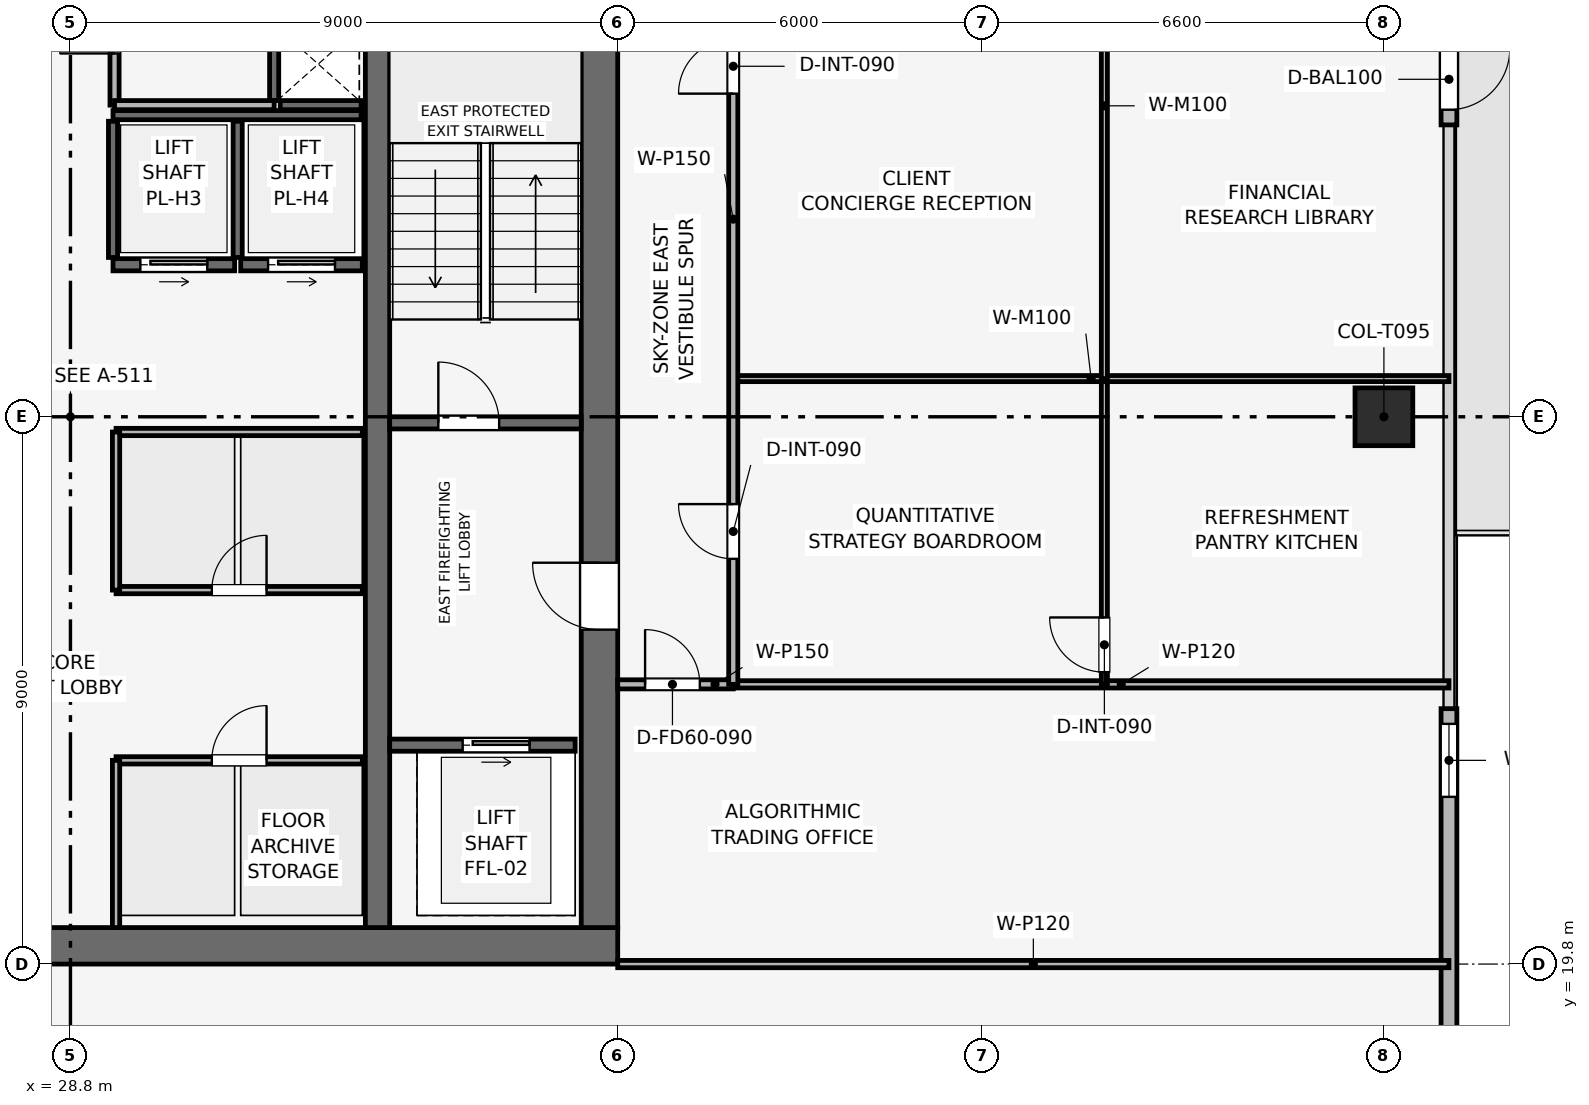
"""IFC4 building model, lengths in metres.
Left out: names, types, materials, properties, quantities, classifications, styles, units other than length and angle.
Written with IfcOpenShell. Run it as: python <this file> out.ifc"""

import sys

from ifc_helpers import new_model, si_unit, direction, frame, frame_2d, origin, origin_2d, place, context, subcontext, project, spatial, rectangle, extrude, element, fill, save


model = new_model("IFC4")
c1 = context("Model", 3, precision=1e-05, world=origin(), true_north=direction((0.0, 1.0)))
c2 = subcontext(c1, "Body", "Model", "MODEL_VIEW")
j1 = project(units=[si_unit("LENGTHUNIT", "METRE"), si_unit("PLANEANGLEUNIT", "RADIAN")], contexts=[c1])
p1 = place(None, origin())
s1 = spatial("IfcSite", under=j1, at=p1, CompositionType="ELEMENT")
p2 = place(p1, origin())
s2 = spatial("IfcBuilding", under=s1, at=p2, CompositionType="ELEMENT")
p3 = place(p2, frame((0.0, 0.0, 321.75)))
s3 = spatial("IfcBuildingStorey", under=s2, at=p3, CompositionType="ELEMENT", Elevation=321.75)
p4 = place(p3, frame((19.8, 20.1, 0.0), z_axis=(0.0, 0.0, 1.0), x_axis=(1.0, 0.0, 0.0)))
e1 = element("IfcWall", 1, at=p4, inside=s3, PredefinedType="SHEAR", context=c2, shape_type="SweptSolid", body=[
    extrude(rectangle(XDim=18.0, YDim=0.6, at=frame_2d((9.0, 0.0))), origin(), (0.0, 0.0, 1.0), 3.75),
])
p5 = place(p3, frame((37.5, 20.4, 0.0), z_axis=(0.0, 0.0, 1.0), x_axis=(0.0, 1.0, 0.0)))
e2 = element("IfcWall", 2, at=p5, inside=s3, PredefinedType="SHEAR", context=c2, shape_type="SweptSolid", body=[
    extrude(rectangle(XDim=16.8, YDim=0.6, at=frame_2d((8.4, 0.0))), origin(), (0.0, 0.0, 1.0), 3.75),
])
p6 = place(p5, frame((4.9, 0.0, 0.0)))
e3 = element("IfcOpeningElement", 3, at=p6, cuts=e2, PredefinedType="OPENING", context=c2, shape_type="SweptSolid", body=[
    extrude(rectangle(XDim=1.1, YDim=2.15, at=frame_2d((0.55, 1.075))), frame((0.0, 0.31, 0.0), z_axis=(0.0, -1.0, 0.0), x_axis=(1.0, 0.0, 0.0)), (0.0, 0.0, 1.0), 0.62),
])
p7 = place(p3, frame((33.85, 20.4, 0.0), z_axis=(0.0, 0.0, 1.0), x_axis=(0.0, 1.0, 0.0)))
e4 = element("IfcWall", 4, at=p7, inside=s3, PredefinedType="SHEAR", context=c2, shape_type="SweptSolid", body=[
    extrude(rectangle(XDim=16.8, YDim=0.4, at=frame_2d((8.4, 0.0))), origin(), (0.0, 0.0, 1.0), 3.75),
])
p8 = place(p3, frame((50.4, 28.8, 0.003), z_axis=(0.0, 0.0, 1.0), x_axis=(1.0, 0.0, 0.0)))
e5 = element("IfcColumn", 5, at=p8, inside=s3, PredefinedType="COLUMN", context=c2, shape_type="SweptSolid", body=[
    extrude(rectangle(XDim=0.95, YDim=0.95, at=origin_2d()), origin(), (0.0, 0.0, 1.0), 3.504),
])
p9 = place(p3, frame((51.47, 45.3, 0.0), z_axis=(0.0, 0.0, 1.0), x_axis=(0.0, -1.0, 0.0)))
e6 = element("IfcWall", 6, at=p9, inside=s3, PredefinedType="SOLIDWALL", context=c2, shape_type="SweptSolid", body=[
    extrude(rectangle(XDim=11.7, YDim=0.26, at=frame_2d((5.85, 0.0))), origin(), (0.0, 0.0, 1.0), 3.51),
])
p10 = place(p9, frame((10.45, 0.0, 0.0)))
e7 = element("IfcOpeningElement", 7, at=p10, cuts=e6, PredefinedType="OPENING", context=c2, shape_type="SweptSolid", body=[
    extrude(rectangle(XDim=1.0, YDim=2.2, at=frame_2d((0.5, 1.1))), frame((0.0, 0.14, 0.0), z_axis=(0.0, -1.0, 0.0), x_axis=(1.0, 0.0, 0.0)), (0.0, 0.0, 1.0), 0.28),
])
p11 = place(p3, frame((51.47, 24.0, 0.0), z_axis=(0.0, 0.0, 1.0), x_axis=(0.0, -1.0, 0.0)))
e8 = element("IfcWall", 8, at=p11, inside=s3, PredefinedType="SOLIDWALL", context=c2, shape_type="SweptSolid", body=[
    extrude(rectangle(XDim=11.7, YDim=0.26, at=frame_2d((5.85, 0.0))), origin(), (0.0, 0.0, 1.0), 3.51),
])
p12 = place(p11, frame((0.25, 0.0, 0.9)))
e9 = element("IfcOpeningElement", 9, at=p12, cuts=e8, PredefinedType="OPENING", context=c2, shape_type="SweptSolid", body=[
    extrude(rectangle(XDim=1.2, YDim=2.1, at=frame_2d((0.6, 1.05))), frame((0.0, 0.14, 0.0), z_axis=(0.0, -1.0, 0.0), x_axis=(1.0, 0.0, 0.0)), (0.0, 0.0, 1.0), 0.28),
])
p13 = place(p3, frame((34.05, 28.7, 0.0), z_axis=(0.0, 0.0, 1.0), x_axis=(1.0, 0.0, 0.0)))
e10 = element("IfcWall", 10, at=p13, inside=s3, PredefinedType="SHEAR", context=c2, shape_type="SweptSolid", body=[
    extrude(rectangle(XDim=3.15, YDim=0.2, at=frame_2d((1.575, 0.0))), origin(), (0.0, 0.0, 1.0), 3.51),
])
p14 = place(p13, frame((0.8, 0.0, 0.0)))
e11 = element("IfcOpeningElement", 11, at=p14, cuts=e10, PredefinedType="OPENING", context=c2, shape_type="SweptSolid", body=[
    extrude(rectangle(XDim=1.0, YDim=2.1, at=frame_2d((0.5, 1.05))), frame((0.0, 0.11, 0.0), z_axis=(0.0, -1.0, 0.0), x_axis=(1.0, 0.0, 0.0)), (0.0, 0.0, 1.0), 0.22),
])
p15 = place(p3, frame((32.15, 34.0, 0.0), z_axis=(0.0, 0.0, 1.0), x_axis=(0.0, 1.0, 0.0)))
e12 = element("IfcWall", 12, at=p15, inside=s3, PredefinedType="SHEAR", context=c2, shape_type="SweptSolid", body=[
    extrude(rectangle(XDim=3.2, YDim=0.15, at=frame_2d((1.6, 0.0))), origin(), (0.0, 0.0, 1.0), 3.51),
])
p16 = place(p3, frame((32.25, 33.925, 0.0), z_axis=(0.0, 0.0, 1.0), x_axis=(1.0, 0.0, 0.0)))
e13 = element("IfcWall", 13, at=p16, inside=s3, PredefinedType="SHEAR", context=c2, shape_type="SweptSolid", body=[
    extrude(rectangle(XDim=1.33, YDim=0.15, at=frame_2d((0.665, 0.0))), origin(), (0.0, 0.0, 1.0), 3.51),
])
p17 = place(p3, frame((34.05, 23.4, 0.0), z_axis=(0.0, 0.0, 1.0), x_axis=(1.0, 0.0, 0.0)))
e14 = element("IfcWall", 14, at=p17, inside=s3, PredefinedType="SHEAR", context=c2, shape_type="SweptSolid", body=[
    extrude(rectangle(XDim=3.05, YDim=0.2, at=frame_2d((1.525, 0.0))), origin(), (0.0, 0.0, 1.0), 3.51),
])
p18 = place(p17, frame((1.2, 0.0, 0.0)))
e15 = element("IfcOpeningElement", 15, at=p18, cuts=e14, PredefinedType="OPENING", context=c2, shape_type="SweptSolid", body=[
    extrude(rectangle(XDim=1.1, YDim=2.15, at=frame_2d((0.55, 1.075))), frame((0.0, 0.11, 0.0), z_axis=(0.0, -1.0, 0.0), x_axis=(1.0, 0.0, 0.0)), (0.0, 0.0, 1.0), 0.22),
])
p19 = place(p3, frame((29.5, 31.3, 0.0), z_axis=(0.0, 0.0, 1.0), x_axis=(1.0, 0.0, 0.0)))
e16 = element("IfcWall", 16, at=p19, inside=s3, PredefinedType="SHEAR", context=c2, shape_type="SweptSolid", body=[
    extrude(rectangle(XDim=2.0, YDim=0.2, at=frame_2d((1.0, 0.0))), origin(), (0.0, 0.0, 1.0), 3.51),
])
p20 = place(p19, frame((0.45, 0.0, 0.0)))
e17 = element("IfcOpeningElement", 17, at=p20, cuts=e16, PredefinedType="OPENING", context=c2, shape_type="SweptSolid", body=[
    extrude(rectangle(XDim=1.1, YDim=2.15, at=frame_2d((0.55, 1.075))), frame((0.0, 0.11, 0.0), z_axis=(0.0, -1.0, 0.0), x_axis=(1.0, 0.0, 0.0)), (0.0, 0.0, 1.0), 0.22),
])
p21 = place(p3, frame((31.6, 31.3, 0.0), z_axis=(0.0, 0.0, 1.0), x_axis=(1.0, 0.0, 0.0)))
e18 = element("IfcWall", 18, at=p21, inside=s3, PredefinedType="SHEAR", context=c2, shape_type="SweptSolid", body=[
    extrude(rectangle(XDim=2.0, YDim=0.2, at=frame_2d((1.0, 0.0))), origin(), (0.0, 0.0, 1.0), 3.51),
])
p22 = place(p21, frame((0.45, 0.0, 0.0)))
e19 = element("IfcOpeningElement", 19, at=p22, cuts=e18, PredefinedType="OPENING", context=c2, shape_type="SweptSolid", body=[
    extrude(rectangle(XDim=1.1, YDim=2.15, at=frame_2d((0.55, 1.075))), frame((0.0, 0.11, 0.0), z_axis=(0.0, -1.0, 0.0), x_axis=(1.0, 0.0, 0.0)), (0.0, 0.0, 1.0), 0.22),
])
p23 = place(p3, frame((29.5, 33.76, 0.0), z_axis=(0.0, 0.0, 1.0), x_axis=(1.0, 0.0, 0.0)))
e20 = element("IfcWall", 20, at=p23, inside=s3, PredefinedType="SHEAR", context=c2, shape_type="SweptSolid", body=[
    extrude(rectangle(XDim=4.08, YDim=0.15, at=frame_2d((2.04, 0.0))), origin(), (0.0, 0.0, 1.0), 3.51),
])
for number, where, z_axis, x_axis in (
    (21, (29.5, 31.42, 0.0), (0.0, 0.0, 1.0), (0.0, 1.0, 0.0)),
    (22, (31.55, 31.42, 0.0), (0.0, 0.0, 1.0), (0.0, 1.0, 0.0)),
):
    element("IfcWall", number, at=place(p3, frame(where, z_axis=z_axis, x_axis=x_axis)), inside=s3, PredefinedType="SHEAR", context=c2, shape_type="SweptSolid", body=[
        extrude(rectangle(XDim=2.24, YDim=0.15, at=frame_2d((1.12, 0.0))), origin(), (0.0, 0.0, 1.0), 3.51),
    ])
p24 = place(p3, frame((29.525, 33.925, 0.0), z_axis=(0.0, 0.0, 1.0), x_axis=(0.0, 1.0, 0.0)))
e23 = element("IfcWall", 23, at=p24, inside=s3, PredefinedType="PARTITIONING", context=c2, shape_type="SweptSolid", body=[
    extrude(rectangle(XDim=3.275, YDim=0.15, at=frame_2d((1.637, 0.0))), origin(), (0.0, 0.0, 1.0), 3.51),
])
p25 = place(p24, frame((0.85, 0.0, 0.0)))
e24 = element("IfcOpeningElement", 24, at=p25, cuts=e23, PredefinedType="OPENING", context=c2, shape_type="SweptSolid", body=[
    extrude(rectangle(XDim=0.9, YDim=2.1, at=frame_2d((0.45, 1.05))), frame((0.0, 0.085, 0.0), z_axis=(0.0, -1.0, 0.0), x_axis=(1.0, 0.0, 0.0)), (0.0, 0.0, 1.0), 0.17),
])
p26 = place(p3, frame((29.525, 33.925, 0.0), z_axis=(0.0, 0.0, 1.0), x_axis=(1.0, 0.0, 0.0)))
e25 = element("IfcWall", 25, at=p26, inside=s3, PredefinedType="PARTITIONING", context=c2, shape_type="SweptSolid", body=[
    extrude(rectangle(XDim=2.625, YDim=0.15, at=frame_2d((1.312, 0.0))), origin(), (0.0, 0.0, 1.0), 3.51),
])
p27 = place(p3, frame((29.55, 23.15, 0.0), z_axis=(0.0, 0.0, 1.0), x_axis=(1.0, 0.0, 0.0)))
e26 = element("IfcWall", 26, at=p27, inside=s3, PredefinedType="PARTITIONING", context=c2, shape_type="SweptSolid", body=[
    extrude(rectangle(XDim=4.05, YDim=0.12, at=frame_2d((2.025, 0.0))), origin(), (0.0, 0.0, 1.0), 3.51),
])
p28 = place(p27, frame((1.575, 0.0, 0.0)))
e27 = element("IfcOpeningElement", 27, at=p28, cuts=e26, PredefinedType="OPENING", context=c2, shape_type="SweptSolid", body=[
    extrude(rectangle(XDim=0.9, YDim=2.1, at=frame_2d((0.45, 1.05))), frame((0.0, 0.07, 0.0), z_axis=(0.0, -1.0, 0.0), x_axis=(1.0, 0.0, 0.0)), (0.0, 0.0, 1.0), 0.14),
])
p29 = place(p3, frame((29.55, 20.4, 0.0), z_axis=(0.0, 0.0, 1.0), x_axis=(0.0, 1.0, 0.0)))
e28 = element("IfcWall", 28, at=p29, inside=s3, PredefinedType="PARTITIONING", context=c2, shape_type="SweptSolid", body=[
    extrude(rectangle(XDim=2.75, YDim=0.12, at=frame_2d((1.375, 0.0))), origin(), (0.0, 0.0, 1.0), 3.51),
])
p30 = place(p3, frame((29.55, 25.95, 0.0), z_axis=(0.0, 0.0, 1.0), x_axis=(1.0, 0.0, 0.0)))
e29 = element("IfcWall", 29, at=p30, inside=s3, PredefinedType="PARTITIONING", context=c2, shape_type="SweptSolid", body=[
    extrude(rectangle(XDim=4.05, YDim=0.12, at=frame_2d((2.025, 0.0))), origin(), (0.0, 0.0, 1.0), 3.51),
])
p31 = place(p30, frame((1.575, 0.0, 0.0)))
e30 = element("IfcOpeningElement", 30, at=p31, cuts=e29, PredefinedType="OPENING", context=c2, shape_type="SweptSolid", body=[
    extrude(rectangle(XDim=0.9, YDim=2.1, at=frame_2d((0.45, 1.05))), frame((0.0, 0.07, 0.0), z_axis=(0.0, -1.0, 0.0), x_axis=(1.0, 0.0, 0.0)), (0.0, 0.0, 1.0), 0.14),
])
p32 = place(p3, frame((29.55, 28.55, 0.0), z_axis=(0.0, 0.0, 1.0), x_axis=(1.0, 0.0, 0.0)))
e31 = element("IfcWall", 31, at=p32, inside=s3, PredefinedType="PARTITIONING", context=c2, shape_type="SweptSolid", body=[
    extrude(rectangle(XDim=4.05, YDim=0.12, at=frame_2d((2.025, 0.0))), origin(), (0.0, 0.0, 1.0), 3.51),
])
p33 = place(p3, frame((29.55, 25.95, 0.0), z_axis=(0.0, 0.0, 1.0), x_axis=(0.0, 1.0, 0.0)))
e32 = element("IfcWall", 32, at=p33, inside=s3, PredefinedType="PARTITIONING", context=c2, shape_type="SweptSolid", body=[
    extrude(rectangle(XDim=2.6, YDim=0.12, at=frame_2d((1.3, 0.0))), origin(), (0.0, 0.0, 1.0), 3.51),
])
p34 = place(p3, frame((37.8, 19.8, 0.0), z_axis=(0.0, 0.0, 1.0), x_axis=(1.0, 0.0, 0.0)))
e33 = element("IfcWall", 33, at=p34, inside=s3, PredefinedType="PARTITIONING", context=c2, shape_type="SweptSolid", body=[
    extrude(rectangle(XDim=13.67, YDim=0.12, at=frame_2d((6.835, 0.0))), origin(), (0.0, 0.0, 1.0), 3.095),
])
p35 = place(p3, frame((37.8, 24.4, 0.0), z_axis=(0.0, 0.0, 1.0), x_axis=(1.0, 0.0, 0.0)))
e34 = element("IfcWall", 34, at=p35, inside=s3, PredefinedType="PARTITIONING", context=c2, shape_type="SweptSolid", body=[
    extrude(rectangle(XDim=1.9, YDim=0.15, at=frame_2d((0.95, 0.0))), origin(), (0.0, 0.0, 1.0), 3.51),
])
p36 = place(p35, frame((0.45, 0.0, 0.0)))
e35 = element("IfcOpeningElement", 35, at=p36, cuts=e34, PredefinedType="OPENING", context=c2, shape_type="SweptSolid", body=[
    extrude(rectangle(XDim=0.9, YDim=2.1, at=frame_2d((0.45, 1.05))), frame((0.0, 0.085, 0.0), z_axis=(0.0, -1.0, 0.0), x_axis=(1.0, 0.0, 0.0)), (0.0, 0.0, 1.0), 0.17),
])
p37 = place(p3, frame((39.7, 24.4, 0.0), z_axis=(0.0, 0.0, 1.0), x_axis=(1.0, 0.0, 0.0)))
e36 = element("IfcWall", 36, at=p37, inside=s3, PredefinedType="PARTITIONING", context=c2, shape_type="SweptSolid", body=[
    extrude(rectangle(XDim=11.77, YDim=0.12, at=frame_2d((5.885, 0.0))), origin(), (0.0, 0.0, 1.0), 3.135),
])
p38 = place(p3, frame((45.803, 24.4, 0.0), z_axis=(0.0, 0.0, 1.0), x_axis=(0.0, 1.0, 0.0)))
e37 = element("IfcWall", 37, at=p38, inside=s3, PredefinedType="MOVABLE", context=c2, shape_type="SweptSolid", body=[
    extrude(rectangle(XDim=5.028, YDim=0.1, at=frame_2d((2.514, 0.0))), origin(), (0.0, 0.0, 1.0), 3.095),
])
p39 = place(p38, frame((0.2, 0.0, 0.0)))
e38 = element("IfcOpeningElement", 38, at=p39, cuts=e37, PredefinedType="OPENING", context=c2, shape_type="SweptSolid", body=[
    extrude(rectangle(XDim=0.9, YDim=2.1, at=frame_2d((0.45, 1.05))), frame((0.0, 0.06, 0.0), z_axis=(0.0, -1.0, 0.0), x_axis=(1.0, 0.0, 0.0)), (0.0, 0.0, 1.0), 0.12),
])
p40 = place(p3, frame((39.7, 29.428, 0.0), z_axis=(0.0, 0.0, 1.0), x_axis=(1.0, 0.0, 0.0)))
e39 = element("IfcWall", 39, at=p40, inside=s3, PredefinedType="MOVABLE", context=c2, shape_type="SweptSolid", body=[
    extrude(rectangle(XDim=11.77, YDim=0.1, at=frame_2d((5.885, 0.0))), origin(), (0.0, 0.0, 1.0), 3.135),
])
p41 = place(p3, frame((45.803, 29.428, 0.0), z_axis=(0.0, 0.0, 1.0), x_axis=(0.0, 1.0, 0.0)))
e40 = element("IfcWall", 40, at=p41, inside=s3, PredefinedType="MOVABLE", context=c2, shape_type="SweptSolid", body=[
    extrude(rectangle(XDim=10.272, YDim=0.1, at=frame_2d((5.136, 0.0))), origin(), (0.0, 0.0, 1.0), 3.095),
])
p42 = place(p41, frame((5.808, 0.0, 0.0)))
e41 = element("IfcOpeningElement", 41, at=p42, cuts=e40, PredefinedType="OPENING", context=c2, shape_type="SweptSolid", body=[
    extrude(rectangle(XDim=0.9, YDim=2.1, at=frame_2d((0.45, 1.05))), frame((0.0, 0.06, 0.0), z_axis=(0.0, -1.0, 0.0), x_axis=(1.0, 0.0, 0.0)), (0.0, 0.0, 1.0), 0.12),
])
p43 = place(p3, frame((39.7, 24.4, 0.0), z_axis=(0.0, 0.0, 1.0), x_axis=(0.0, 1.0, 0.0)))
e42 = element("IfcWall", 42, at=p43, inside=s3, PredefinedType="PARTITIONING", context=c2, shape_type="SweptSolid", body=[
    extrude(rectangle(XDim=15.3, YDim=0.15, at=frame_2d((7.65, 0.0))), origin(), (0.0, 0.0, 1.0), 3.095),
])
p44 = place(p43, frame((2.064, 0.0, 0.0)))
e43 = element("IfcOpeningElement", 43, at=p44, cuts=e42, PredefinedType="OPENING", context=c2, shape_type="SweptSolid", body=[
    extrude(rectangle(XDim=0.9, YDim=2.1, at=frame_2d((0.45, 1.05))), frame((0.0, 0.085, 0.0), z_axis=(0.0, -1.0, 0.0), x_axis=(1.0, 0.0, 0.0)), (0.0, 0.0, 1.0), 0.17),
])
p45 = place(p43, frame((9.714, 0.0, 0.0)))
e44 = element("IfcOpeningElement", 44, at=p45, cuts=e42, PredefinedType="OPENING", context=c2, shape_type="SweptSolid", body=[
    extrude(rectangle(XDim=0.9, YDim=2.1, at=frame_2d((0.45, 1.05))), frame((0.0, 0.085, 0.0), z_axis=(0.0, -1.0, 0.0), x_axis=(1.0, 0.0, 0.0)), (0.0, 0.0, 1.0), 0.17),
])
p46 = place(p10, origin())
e45 = element("IfcDoor", 45, at=p46, inside=s3, OperationType="SINGLE_SWING_LEFT", PredefinedType="DOOR", context=c2, shape_type="SweptSolid", body=[
    extrude(rectangle(XDim=1.0, YDim=2.2, at=frame_2d((0.5, 1.1))), frame((0.0, 0.025, 0.0), z_axis=(0.0, -1.0, 0.0), x_axis=(1.0, 0.0, 0.0)), (0.0, 0.0, 1.0), 0.05),
])
fill(e7, e45)
p47 = place(p12, origin())
e46 = element("IfcWindow", 46, at=p47, inside=s3, PartitioningType="SINGLE_PANEL", PredefinedType="WINDOW", context=c2, shape_type="SweptSolid", body=[
    extrude(rectangle(XDim=1.2, YDim=2.1, at=frame_2d((0.6, 1.05))), frame((0.0, 0.03, 0.0), z_axis=(0.0, -1.0, 0.0), x_axis=(1.0, 0.0, 0.0)), (0.0, 0.0, 1.0), 0.06),
])
fill(e9, e46)
p48 = place(p14, origin())
e47 = element("IfcDoor", 47, at=p48, inside=s3, OperationType="SINGLE_SWING_LEFT", PredefinedType="DOOR", context=c2, shape_type="SweptSolid", body=[
    extrude(rectangle(XDim=1.0, YDim=2.1, at=frame_2d((0.5, 1.05))), frame((0.0, 0.025, 0.0), z_axis=(0.0, -1.0, 0.0), x_axis=(1.0, 0.0, 0.0)), (0.0, 0.0, 1.0), 0.05),
])
fill(e11, e47)
p49 = place(p18, origin())
e48 = element("IfcDoor", 48, at=p49, inside=s3, OperationType="SLIDING_TO_RIGHT", PredefinedType="DOOR", context=c2, shape_type="SweptSolid", body=[
    extrude(rectangle(XDim=1.1, YDim=2.15, at=frame_2d((0.55, 1.075))), frame((0.0, 0.025, 0.0), z_axis=(0.0, -1.0, 0.0), x_axis=(1.0, 0.0, 0.0)), (0.0, 0.0, 1.0), 0.05),
])
fill(e15, e48)
p50 = place(p20, origin())
e49 = element("IfcDoor", 49, at=p50, inside=s3, OperationType="SLIDING_TO_RIGHT", PredefinedType="DOOR", context=c2, shape_type="SweptSolid", body=[
    extrude(rectangle(XDim=1.1, YDim=2.15, at=frame_2d((0.55, 1.075))), frame((0.0, 0.025, 0.0), z_axis=(0.0, -1.0, 0.0), x_axis=(1.0, 0.0, 0.0)), (0.0, 0.0, 1.0), 0.05),
])
fill(e17, e49)
p51 = place(p22, origin())
e50 = element("IfcDoor", 50, at=p51, inside=s3, OperationType="SLIDING_TO_RIGHT", PredefinedType="DOOR", context=c2, shape_type="SweptSolid", body=[
    extrude(rectangle(XDim=1.1, YDim=2.15, at=frame_2d((0.55, 1.075))), frame((0.0, 0.025, 0.0), z_axis=(0.0, -1.0, 0.0), x_axis=(1.0, 0.0, 0.0)), (0.0, 0.0, 1.0), 0.05),
])
fill(e19, e50)
p52 = place(p25, origin())
e51 = element("IfcDoor", 51, at=p52, inside=s3, OperationType="SINGLE_SWING_LEFT", PredefinedType="DOOR", context=c2, shape_type="SweptSolid", body=[
    extrude(rectangle(XDim=0.9, YDim=2.1, at=frame_2d((0.45, 1.05))), frame((0.0, 0.025, 0.0), z_axis=(0.0, -1.0, 0.0), x_axis=(1.0, 0.0, 0.0)), (0.0, 0.0, 1.0), 0.05),
])
fill(e24, e51)
p53 = place(p28, origin())
e52 = element("IfcDoor", 52, at=p53, inside=s3, OperationType="SINGLE_SWING_RIGHT", PredefinedType="DOOR", context=c2, shape_type="SweptSolid", body=[
    extrude(rectangle(XDim=0.9, YDim=2.1, at=frame_2d((0.45, 1.05))), frame((0.0, 0.025, 0.0), z_axis=(0.0, -1.0, 0.0), x_axis=(1.0, 0.0, 0.0)), (0.0, 0.0, 1.0), 0.05),
])
fill(e27, e52)
p54 = place(p31, origin())
e53 = element("IfcDoor", 53, at=p54, inside=s3, OperationType="SINGLE_SWING_RIGHT", PredefinedType="DOOR", context=c2, shape_type="SweptSolid", body=[
    extrude(rectangle(XDim=0.9, YDim=2.1, at=frame_2d((0.45, 1.05))), frame((0.0, 0.025, 0.0), z_axis=(0.0, -1.0, 0.0), x_axis=(1.0, 0.0, 0.0)), (0.0, 0.0, 1.0), 0.05),
])
fill(e30, e53)
p55 = place(p36, origin())
e54 = element("IfcDoor", 54, at=p55, inside=s3, OperationType="SINGLE_SWING_LEFT", PredefinedType="DOOR", context=c2, shape_type="SweptSolid", body=[
    extrude(rectangle(XDim=0.9, YDim=2.1, at=frame_2d((0.45, 1.05))), frame((0.0, 0.025, 0.0), z_axis=(0.0, -1.0, 0.0), x_axis=(1.0, 0.0, 0.0)), (0.0, 0.0, 1.0), 0.05),
])
fill(e35, e54)
p56 = place(p39, origin())
e55 = element("IfcDoor", 55, at=p56, inside=s3, OperationType="SINGLE_SWING_RIGHT", PredefinedType="DOOR", context=c2, shape_type="SweptSolid", body=[
    extrude(rectangle(XDim=0.9, YDim=2.1, at=frame_2d((0.45, 1.05))), frame((0.0, 0.025, 0.0), z_axis=(0.0, -1.0, 0.0), x_axis=(1.0, 0.0, 0.0)), (0.0, 0.0, 1.0), 0.05),
])
fill(e38, e55)
p57 = place(p44, origin())
e56 = element("IfcDoor", 56, at=p57, inside=s3, OperationType="SINGLE_SWING_RIGHT", PredefinedType="DOOR", context=c2, shape_type="SweptSolid", body=[
    extrude(rectangle(XDim=0.9, YDim=2.1, at=frame_2d((0.45, 1.05))), frame((0.0, 0.025, 0.0), z_axis=(0.0, -1.0, 0.0), x_axis=(1.0, 0.0, 0.0)), (0.0, 0.0, 1.0), 0.05),
])
fill(e43, e56)
p58 = place(p45, origin())
e57 = element("IfcDoor", 57, at=p58, inside=s3, OperationType="SINGLE_SWING_LEFT", PredefinedType="DOOR", context=c2, shape_type="SweptSolid", body=[
    extrude(rectangle(XDim=0.9, YDim=2.1, at=frame_2d((0.45, 1.05))), frame((0.0, 0.025, 0.0), z_axis=(0.0, -1.0, 0.0), x_axis=(1.0, 0.0, 0.0)), (0.0, 0.0, 1.0), 0.05),
])
fill(e44, e57)
p59 = place(p6, origin())
e58 = element("IfcDoor", 58, at=p59, inside=s3, OperationType="SINGLE_SWING_RIGHT", PredefinedType="DOOR", context=c2, shape_type="SweptSolid", body=[
    extrude(rectangle(XDim=1.1, YDim=2.15, at=frame_2d((0.55, 1.075))), frame((0.0, 0.025, 0.0), z_axis=(0.0, -1.0, 0.0), x_axis=(1.0, 0.0, 0.0)), (0.0, 0.0, 1.0), 0.05),
])
fill(e3, e58)
save(model, sys.argv[1])
